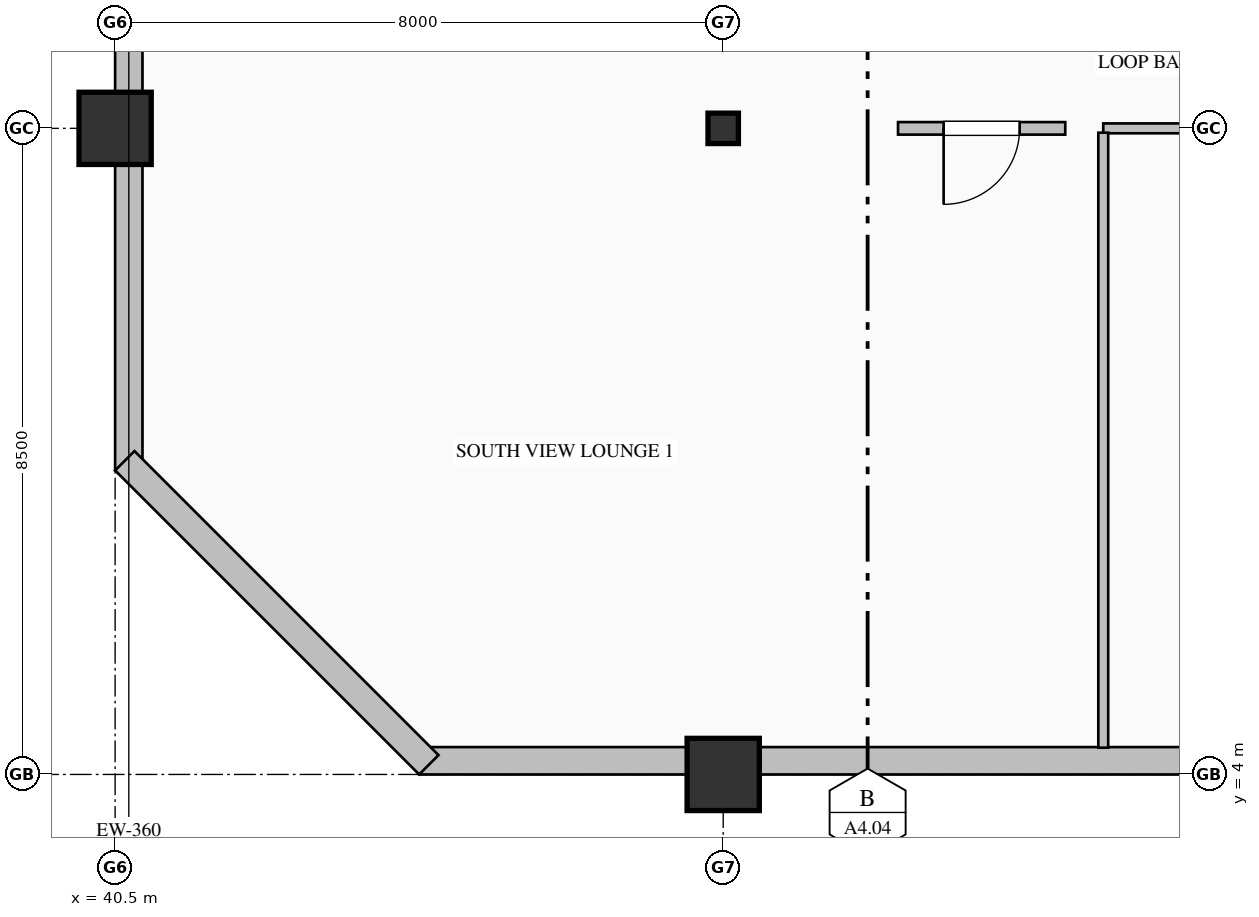
"""IFC4 building model, lengths in metres.
Left out: names, types, materials, properties, quantities, classifications, styles, units other than length and angle.
Written with IfcOpenShell. Run it as: python <this file> out.ifc"""

import sys

from ifc_helpers import new_model, si_unit, direction, frame, frame_2d, origin, origin_2d, place, context, subcontext, project, spatial, rectangle, hollow_rectangle, i_section, extrude, element, fill, save


model = new_model("IFC4")
c1 = context("Model", 3, precision=1e-05, world=origin(), true_north=direction((0.0, 1.0)))
c2 = subcontext(c1, "Body", "Model", "MODEL_VIEW")
j1 = project(units=[si_unit("LENGTHUNIT", "METRE"), si_unit("PLANEANGLEUNIT", "RADIAN")], contexts=[c1])
p1 = place(None, origin())
s1 = spatial("IfcSite", under=j1, at=p1, CompositionType="ELEMENT")
p2 = place(p1, origin())
s2 = spatial("IfcBuilding", under=s1, at=p2, CompositionType="ELEMENT")
p3 = place(p2, frame((0.0, 0.0, 159.0)))
s3 = spatial("IfcBuildingStorey", under=s2, at=p3, CompositionType="ELEMENT", Elevation=159.0)
for number, where, z_axis, x_axis in (
    (1, (40.5, 12.5, 0.0), (0.0, 0.0, 1.0), (1.0, 0.0, 0.0)),
    (2, (48.5, 4.0, 0.0), (0.0, 0.0, 1.0), (1.0, 0.0, 0.0)),
):
    element("IfcColumn", number, at=place(p3, frame(where, z_axis=z_axis, x_axis=x_axis)), inside=s3, PredefinedType="COLUMN", context=c2, shape_type="SweptSolid", body=[
        extrude(hollow_rectangle(XDim=0.95, YDim=0.95, WallThickness=0.036, at=origin_2d()), origin(), (0.0, 0.0, 1.0), 4.0),
    ])
p4 = place(p3, frame((48.5, 12.5, 0.0), z_axis=(0.0, 0.0, 1.0), x_axis=(1.0, 0.0, 0.0)))
e3 = element("IfcColumn", 3, at=p4, inside=s3, PredefinedType="COLUMN", context=c2, shape_type="SweptSolid", body=[
    extrude(i_section(OverallWidth=0.4, OverallDepth=0.4, WebThickness=0.013, FlangeThickness=0.021, FilletRadius=0.022, at=origin_2d()), origin(), (0.0, 0.0, 1.0), 4.0),
])
p5 = place(p3, frame((40.68, 8.0, 0.0), z_axis=(0.0, 0.0, 1.0), x_axis=(0.0, 1.0, 0.0)))
e4 = element("IfcWall", 4, at=p5, inside=s3, PredefinedType="SOLIDWALL", context=c2, shape_type="SweptSolid", body=[
    extrude(rectangle(XDim=20.36, YDim=0.36, at=frame_2d((10.18, 0.0))), origin(), (0.0, 0.0, 1.0), 3.165),
])
p6 = place(p3, frame((60.0, 4.18, 0.0), z_axis=(0.0, 0.0, 1.0), x_axis=(-1.0, 0.0, 0.0)))
e5 = element("IfcWall", 5, at=p6, inside=s3, PredefinedType="SOLIDWALL", context=c2, shape_type="SweptSolid", body=[
    extrude(rectangle(XDim=15.5, YDim=0.36, at=frame_2d((7.75, 0.0))), origin(), (0.0, 0.0, 1.0), 3.265),
])
p7 = place(p3, frame((44.627, 4.127, 0.0), z_axis=(0.0, 0.0, 1.0), x_axis=(-0.707106781187, 0.707106781187, 0.0)))
e6 = element("IfcWall", 6, at=p7, inside=s3, PredefinedType="SOLIDWALL", context=c2, shape_type="SweptSolid", body=[
    extrude(rectangle(XDim=5.657, YDim=0.36, at=frame_2d((2.828, 0.0))), origin(), (0.0, 0.0, 1.0), 3.765),
])
p8 = place(p3, frame((53.0, 12.5, 0.0), z_axis=(0.0, 0.0, 1.0), x_axis=(-1.0, 0.0, 0.0)))
e7 = element("IfcWall", 7, at=p8, inside=s3, PredefinedType="PARTITIONING", context=c2, shape_type="SweptSolid", body=[
    extrude(rectangle(XDim=2.2, YDim=0.165, at=frame_2d((1.1, 0.0))), origin(), (0.0, 0.0, 1.0), 3.157),
])
p9 = place(p8, frame((0.6, 0.0, 0.0)))
e8 = element("IfcOpeningElement", 8, at=p9, cuts=e7, PredefinedType="OPENING", context=c2, shape_type="SweptSolid", body=[
    extrude(rectangle(XDim=1.0, YDim=2.15, at=frame_2d((0.5, 1.075))), frame((0.0, 0.093, 0.0), z_axis=(0.0, -1.0, 0.0), x_axis=(1.0, 0.0, 0.0)), (0.0, 0.0, 1.0), 0.185),
])
p10 = place(p3, frame((61.5, 12.5, 0.0), z_axis=(0.0, 0.0, 1.0), x_axis=(-1.0, 0.0, 0.0)))
e9 = element("IfcWall", 9, at=p10, inside=s3, PredefinedType="PARTITIONING", context=c2, shape_type="SweptSolid", body=[
    extrude(rectangle(XDim=8.0, YDim=0.13, at=frame_2d((4.0, 0.0))), origin(), (0.0, 0.0, 1.0), 3.157),
])
p11 = place(p10, frame((3.5, 0.0, 0.0)))
e10 = element("IfcOpeningElement", 10, at=p11, cuts=e9, PredefinedType="OPENING", context=c2, shape_type="SweptSolid", body=[
    extrude(rectangle(XDim=1.0, YDim=2.15, at=frame_2d((0.5, 1.075))), frame((0.0, 0.075, 0.0), z_axis=(0.0, -1.0, 0.0), x_axis=(1.0, 0.0, 0.0)), (0.0, 0.0, 1.0), 0.15),
])
p12 = place(p3, frame((53.5, 12.443, 0.0), z_axis=(0.0, 0.0, 1.0), x_axis=(0.0, -1.0, 0.0)))
e11 = element("IfcWall", 11, at=p12, inside=s3, PredefinedType="PARTITIONING", context=c2, shape_type="SweptSolid", body=[
    extrude(rectangle(XDim=8.091, YDim=0.13, at=frame_2d((4.045, 0.0))), origin(), (0.0, 0.0, 1.0), 3.765),
])
p13 = place(p9, origin())
e12 = element("IfcDoor", 12, at=p13, inside=s3, OperationType="SINGLE_SWING_RIGHT", PredefinedType="DOOR", context=c2, shape_type="SweptSolid", body=[
    extrude(rectangle(XDim=1.0, YDim=2.15, at=frame_2d((0.5, 1.075))), frame((0.0, 0.025, 0.0), z_axis=(0.0, -1.0, 0.0), x_axis=(1.0, 0.0, 0.0)), (0.0, 0.0, 1.0), 0.05),
])
fill(e8, e12)
save(model, sys.argv[1])
